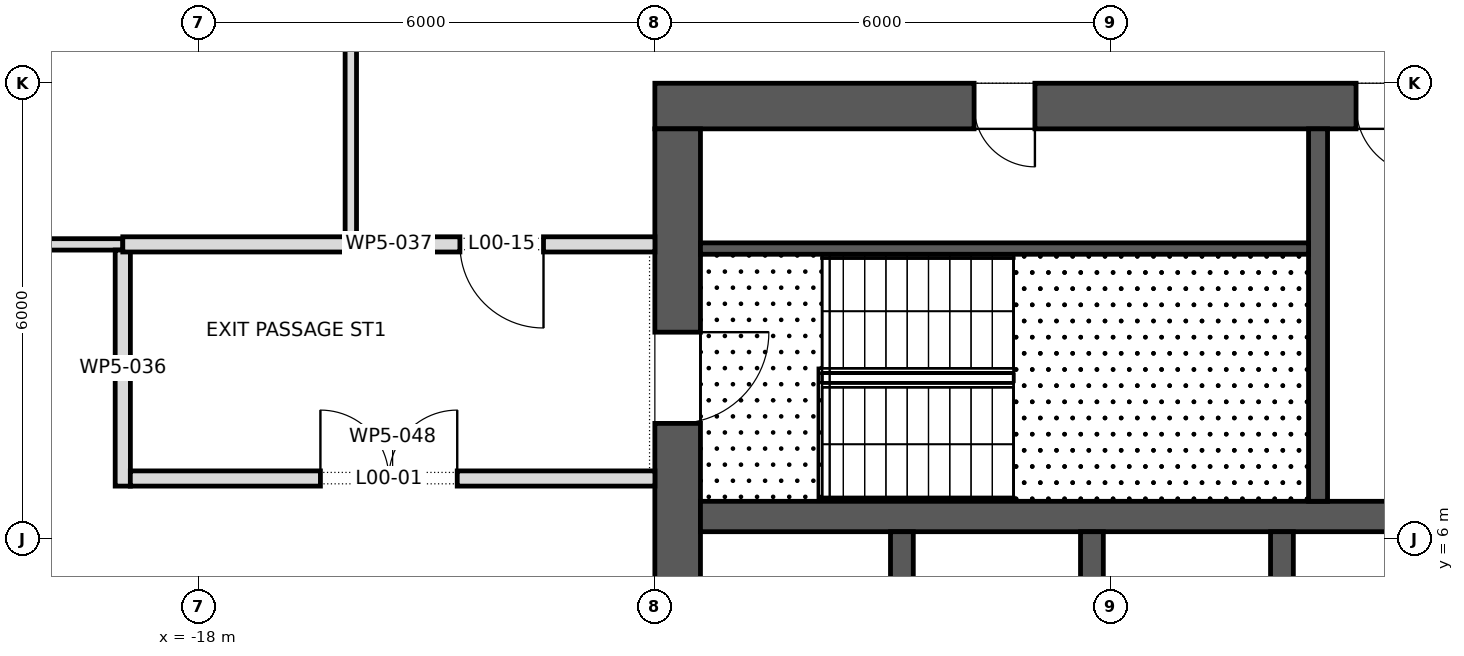
"""IFC4 building model, lengths in metres.
Left out: names, types, materials, properties, quantities, classifications, styles, units other than length and angle.
Written with IfcOpenShell. Run it as: python <this file> out.ifc"""

import sys

from ifc_helpers import new_model, si_unit, direction, frame, frame_2d, origin, place, context, subcontext, project, spatial, polyline, rectangle, outline, extrude, element, fill, save


model = new_model("IFC4")
c1 = context("Model", 3, precision=1e-05, world=origin(), true_north=direction((0.0, 1.0)))
c2 = subcontext(c1, "Body", "Model", "MODEL_VIEW")
j1 = project(units=[si_unit("LENGTHUNIT", "METRE"), si_unit("PLANEANGLEUNIT", "RADIAN")], contexts=[c1])
p1 = place(None, origin())
s1 = spatial("IfcSite", under=j1, at=p1, CompositionType="ELEMENT")
p2 = place(p1, origin())
s2 = spatial("IfcBuilding", under=s1, at=p2, CompositionType="ELEMENT")
p3 = place(p2, origin())
s3 = spatial("IfcBuildingStorey", under=s2, at=p3, CompositionType="ELEMENT", Elevation=0.0)
p4 = place(p3, frame((-12.0, 11.7, 0.0), z_axis=(0.0, 0.0, 1.0), x_axis=(1.0, 0.0, 0.0)))
e1 = element("IfcWall", 1, at=p4, inside=s3, PredefinedType="SHEAR", context=c2, shape_type="SweptSolid", body=[
    extrude(rectangle(XDim=24.0, YDim=0.6, at=frame_2d((12.0, 0.0))), origin(), (0.0, 0.0, 1.0), 7.0),
])
p5 = place(p4, frame((9.225, 0.0, 0.0)))
e2 = element("IfcOpeningElement", 2, at=p5, cuts=e1, PredefinedType="OPENING", context=c2, shape_type="SweptSolid", body=[
    extrude(rectangle(XDim=0.9, YDim=2.1, at=frame_2d((0.45, 1.05))), frame((0.0, 0.312, 0.0), z_axis=(0.0, -1.0, 0.0), x_axis=(1.0, 0.0, 0.0)), (0.0, 0.0, 1.0), 0.624),
])
p6 = place(p4, frame((10.925, 0.0, 0.0)))
e3 = element("IfcOpeningElement", 3, at=p6, cuts=e1, PredefinedType="OPENING", context=c2, shape_type="SweptSolid", body=[
    extrude(rectangle(XDim=0.8, YDim=2.1, at=frame_2d((0.4, 1.05))), frame((0.0, 0.312, 0.0), z_axis=(0.0, -1.0, 0.0), x_axis=(1.0, 0.0, 0.0)), (0.0, 0.0, 1.0), 0.624),
])
p7 = place(p4, frame((4.2, 0.0, 0.0)))
e4 = element("IfcOpeningElement", 4, at=p7, cuts=e1, PredefinedType="OPENING", context=c2, shape_type="SweptSolid", body=[
    extrude(rectangle(XDim=0.8, YDim=2.1, at=frame_2d((0.4, 1.05))), frame((0.0, 0.312, 0.0), z_axis=(0.0, -1.0, 0.0), x_axis=(1.0, 0.0, 0.0)), (0.0, 0.0, 1.0), 0.624),
])
p8 = place(p4, frame((13.8, 0.0, 0.0)))
e5 = element("IfcOpeningElement", 5, at=p8, cuts=e1, PredefinedType="OPENING", context=c2, shape_type="SweptSolid", body=[
    extrude(rectangle(XDim=0.8, YDim=2.1, at=frame_2d((0.4, 1.05))), frame((0.0, 0.312, 0.0), z_axis=(0.0, -1.0, 0.0), x_axis=(1.0, 0.0, 0.0)), (0.0, 0.0, 1.0), 0.624),
])
p9 = place(p4, frame((16.6, 0.0, 0.0)))
e6 = element("IfcOpeningElement", 6, at=p9, cuts=e1, PredefinedType="OPENING", context=c2, shape_type="SweptSolid", body=[
    extrude(rectangle(XDim=0.8, YDim=2.1, at=frame_2d((0.4, 1.05))), frame((0.0, 0.312, 0.0), z_axis=(0.0, -1.0, 0.0), x_axis=(1.0, 0.0, 0.0)), (0.0, 0.0, 1.0), 0.624),
])
p10 = place(p3, frame((-11.7, -11.4, 0.0), z_axis=(0.0, 0.0, 1.0), x_axis=(0.0, 1.0, 0.0)))
e7 = element("IfcWall", 7, at=p10, inside=s3, PredefinedType="SHEAR", context=c2, shape_type="SweptSolid", body=[
    extrude(rectangle(XDim=22.8, YDim=0.6, at=frame_2d((11.4, 0.0))), origin(), (0.0, 0.0, 1.0), 7.0),
])
p11 = place(p10, frame((10.2, 0.0, 0.0)))
e8 = element("IfcOpeningElement", 8, at=p11, cuts=e7, PredefinedType="OPENING", context=c2, shape_type="SweptSolid", body=[
    extrude(rectangle(XDim=2.4, YDim=2.1, at=frame_2d((1.2, 1.05))), frame((0.0, 0.312, 0.0), z_axis=(0.0, -1.0, 0.0), x_axis=(1.0, 0.0, 0.0)), (0.0, 0.0, 1.0), 0.624),
])
p12 = place(p10, frame((18.925, 0.0, 0.0)))
e9 = element("IfcOpeningElement", 9, at=p12, cuts=e7, PredefinedType="OPENING", context=c2, shape_type="SweptSolid", body=[
    extrude(rectangle(XDim=1.2, YDim=2.1, at=frame_2d((0.6, 1.05))), frame((0.0, 0.312, 0.0), z_axis=(0.0, -1.0, 0.0), x_axis=(1.0, 0.0, 0.0)), (0.0, 0.0, 1.0), 0.624),
])
p13 = place(p10, frame((2.675, 0.0, 0.0)))
e10 = element("IfcOpeningElement", 10, at=p13, cuts=e7, PredefinedType="OPENING", context=c2, shape_type="SweptSolid", body=[
    extrude(rectangle(XDim=1.2, YDim=2.1, at=frame_2d((0.6, 1.05))), frame((0.0, 0.312, 0.0), z_axis=(0.0, -1.0, 0.0), x_axis=(1.0, 0.0, 0.0)), (0.0, 0.0, 1.0), 0.624),
])
p14 = place(p3, frame((-11.4, 6.3, 0.0), z_axis=(0.0, 0.0, 1.0), x_axis=(1.0, 0.0, 0.0)))
e11 = element("IfcWall", 11, at=p14, inside=s3, PredefinedType="SHEAR", context=c2, shape_type="SweptSolid", body=[
    extrude(rectangle(XDim=22.8, YDim=0.4, at=frame_2d((11.4, 0.0))), origin(), (0.0, 0.0, 1.0), 7.0),
])
p15 = place(p14, frame((20.85, 0.0, 0.0)))
e12 = element("IfcOpeningElement", 12, at=p15, cuts=e11, PredefinedType="OPENING", context=c2, shape_type="SweptSolid", body=[
    extrude(rectangle(XDim=1.1, YDim=2.1, at=frame_2d((0.55, 1.05))), frame((0.0, 0.212, 0.0), z_axis=(0.0, -1.0, 0.0), x_axis=(1.0, 0.0, 0.0)), (0.0, 0.0, 1.0), 0.424),
])
for number, where, z_axis, x_axis in (
    (13, (-8.75, 3.2, 0.0), (0.0, 0.0, 1.0), (0.0, 1.0, 0.0)),
    (14, (-6.25, 3.2, 0.0), (0.0, 0.0, 1.0), (0.0, 1.0, 0.0)),
    (15, (-3.75, 3.2, 0.0), (0.0, 0.0, 1.0), (0.0, 1.0, 0.0)),
):
    element("IfcWall", number, at=place(p3, frame(where, z_axis=z_axis, x_axis=x_axis)), inside=s3, PredefinedType="SHEAR", context=c2, shape_type="SweptSolid", body=[
        extrude(rectangle(XDim=2.9, YDim=0.3, at=frame_2d((1.45, 0.0))), origin(), (0.0, 0.0, 1.0), 7.0),
    ])
p16 = place(p3, frame((-3.275, 6.5, 0.0), z_axis=(0.0, 0.0, 1.0), x_axis=(0.0, 1.0, 0.0)))
e16 = element("IfcWall", 16, at=p16, inside=s3, PredefinedType="SHEAR", context=c2, shape_type="SweptSolid", body=[
    extrude(rectangle(XDim=4.9, YDim=0.25, at=frame_2d((2.45, 0.0))), origin(), (0.0, 0.0, 1.0), 6.65),
])
p17 = place(p3, frame((-11.4, 9.825, 0.0), z_axis=(0.0, 0.0, 1.0), x_axis=(1.0, 0.0, 0.0)))
e17 = element("IfcWall", 17, at=p17, inside=s3, PredefinedType="SHEAR", context=c2, shape_type="SweptSolid", body=[
    extrude(rectangle(XDim=8.0, YDim=0.15, at=frame_2d((4.0, 0.0))), origin(), (0.0, 0.0, 1.0), 6.65),
])
p18 = place(p3, frame((-35.65, 9.88, 0.0), z_axis=(0.0, 0.0, 1.0), x_axis=(1.0, 0.0, 0.0)))
e18 = element("IfcWall", 18, at=p18, inside=s3, PredefinedType="PARTITIONING", context=c2, shape_type="SweptSolid", body=[
    extrude(outline(polyline([(-0.017, -0.075), (16.651, -0.075), (16.651, 0.075), (0.017, 0.075), (-0.017, -0.075)])), origin(), (0.0, 0.0, 1.0), 6.65),
])
p19 = place(p18, frame((7.445, 0.0, 0.0)))
e19 = element("IfcOpeningElement", 19, at=p19, cuts=e18, PredefinedType="OPENING", context=c2, shape_type="SweptSolid", body=[
    extrude(rectangle(XDim=1.8, YDim=2.1, at=frame_2d((0.9, 1.05))), frame((0.0, 0.087, 0.0), z_axis=(0.0, -1.0, 0.0), x_axis=(1.0, 0.0, 0.0)), (0.0, 0.0, 1.0), 0.174),
])
p20 = place(p3, frame((-19.0, 6.7, 0.0), z_axis=(0.0, 0.0, 1.0), x_axis=(0.0, 1.0, 0.0)))
e20 = element("IfcWall", 20, at=p20, inside=s3, PredefinedType="PARTITIONING", context=c2, shape_type="SweptSolid", body=[
    extrude(rectangle(XDim=3.105, YDim=0.2, at=frame_2d((1.553, 0.0))), origin(), (0.0, 0.0, 1.0), 6.65),
])
p21 = place(p3, frame((-19.0, 9.88, 0.0), z_axis=(0.0, 0.0, 1.0), x_axis=(1.0, 0.0, 0.0)))
e21 = element("IfcWall", 21, at=p21, inside=s3, PredefinedType="PARTITIONING", context=c2, shape_type="SweptSolid", body=[
    extrude(rectangle(XDim=7.001, YDim=0.2, at=frame_2d((3.5, 0.0))), origin(), (0.0, 0.0, 1.0), 6.65),
])
p22 = place(p21, frame((4.435, 0.0, 0.0)))
e22 = element("IfcOpeningElement", 22, at=p22, cuts=e21, PredefinedType="OPENING", context=c2, shape_type="SweptSolid", body=[
    extrude(rectangle(XDim=1.1, YDim=2.1, at=frame_2d((0.55, 1.05))), frame((0.0, 0.112, 0.0), z_axis=(0.0, -1.0, 0.0), x_axis=(1.0, 0.0, 0.0)), (0.0, 0.0, 1.0), 0.224),
])
p23 = place(p3, frame((-16.0, 9.98, 0.0), z_axis=(0.0, 0.0, 1.0), x_axis=(0.0, 1.0, 0.0)))
e23 = element("IfcWall", 23, at=p23, inside=s3, PredefinedType="PARTITIONING", context=c2, shape_type="SweptSolid", body=[
    extrude(rectangle(XDim=14.095, YDim=0.15, at=frame_2d((7.047, 0.0))), origin(), (0.0, 0.0, 1.0), 6.65),
])
p24 = place(p23, frame((5.76, 0.0, 0.0)))
e24 = element("IfcOpeningElement", 24, at=p24, cuts=e23, PredefinedType="OPENING", context=c2, shape_type="SweptSolid", body=[
    extrude(rectangle(XDim=2.4, YDim=2.1, at=frame_2d((1.2, 1.05))), frame((0.0, 0.087, 0.0), z_axis=(0.0, -1.0, 0.0), x_axis=(1.0, 0.0, 0.0)), (0.0, 0.0, 1.0), 0.174),
])
p25 = place(p3, frame((-11.999, 6.8, 0.0), z_axis=(0.0, 0.0, 1.0), x_axis=(-1.0, 0.0, 0.0)))
e25 = element("IfcWall", 25, at=p25, inside=s3, PredefinedType="PARTITIONING", context=c2, shape_type="SweptSolid", body=[
    extrude(rectangle(XDim=6.902, YDim=0.2, at=frame_2d((3.451, 0.0))), origin(), (0.0, 0.0, 1.0), 6.65),
])
p26 = place(p25, frame((2.601, 0.0, 0.0)))
e26 = element("IfcOpeningElement", 26, at=p26, cuts=e25, PredefinedType="OPENING", context=c2, shape_type="SweptSolid", body=[
    extrude(rectangle(XDim=1.8, YDim=2.1, at=frame_2d((0.9, 1.05))), frame((0.0, 0.112, 0.0), z_axis=(0.0, -1.0, 0.0), x_axis=(1.0, 0.0, 0.0)), (0.0, 0.0, 1.0), 0.224),
])
p27 = place(p12, frame((1.2, 0.0, 0.0), z_axis=(0.0, 0.0, 1.0), x_axis=(-1.0, 0.0, 0.0)))
e27 = element("IfcDoor", 27, at=p27, inside=s3, OperationType="SINGLE_SWING_RIGHT", PredefinedType="DOOR", context=c2, shape_type="SweptSolid", body=[
    extrude(rectangle(XDim=1.2, YDim=2.1, at=frame_2d((0.6, 1.05))), frame((0.0, 0.025, 0.0), z_axis=(0.0, -1.0, 0.0), x_axis=(1.0, 0.0, 0.0)), (0.0, 0.0, 1.0), 0.05),
])
fill(e9, e27)
p28 = place(p5, frame((0.9, 0.0, 0.0), z_axis=(0.0, 0.0, 1.0), x_axis=(-1.0, 0.0, 0.0)))
e28 = element("IfcDoor", 28, at=p28, inside=s3, OperationType="SINGLE_SWING_RIGHT", PredefinedType="DOOR", context=c2, shape_type="SweptSolid", body=[
    extrude(rectangle(XDim=0.9, YDim=2.1, at=frame_2d((0.45, 1.05))), frame((0.0, 0.025, 0.0), z_axis=(0.0, -1.0, 0.0), x_axis=(1.0, 0.0, 0.0)), (0.0, 0.0, 1.0), 0.05),
])
fill(e2, e28)
p29 = place(p7, frame((0.8, 0.0, 0.0), z_axis=(0.0, 0.0, 1.0), x_axis=(-1.0, 0.0, 0.0)))
e29 = element("IfcDoor", 29, at=p29, inside=s3, OperationType="SINGLE_SWING_RIGHT", PredefinedType="DOOR", context=c2, shape_type="SweptSolid", body=[
    extrude(rectangle(XDim=0.8, YDim=2.1, at=frame_2d((0.4, 1.05))), frame((0.0, 0.025, 0.0), z_axis=(0.0, -1.0, 0.0), x_axis=(1.0, 0.0, 0.0)), (0.0, 0.0, 1.0), 0.05),
])
fill(e4, e29)
p30 = place(p26, frame((1.8, 0.0, 0.0), z_axis=(0.0, 0.0, 1.0), x_axis=(-1.0, 0.0, 0.0)))
e30 = element("IfcDoor", 30, at=p30, inside=s3, OperationType="DOUBLE_DOOR_SINGLE_SWING", PredefinedType="DOOR", context=c2, shape_type="SweptSolid", body=[
    extrude(rectangle(XDim=1.8, YDim=2.1, at=frame_2d((0.9, 1.05))), frame((0.0, 0.025, 0.0), z_axis=(0.0, -1.0, 0.0), x_axis=(1.0, 0.0, 0.0)), (0.0, 0.0, 1.0), 0.05),
])
fill(e26, e30)
p31 = place(p22, frame((1.1, 0.0, 0.0), z_axis=(0.0, 0.0, 1.0), x_axis=(-1.0, 0.0, 0.0)))
e31 = element("IfcDoor", 31, at=p31, inside=s3, OperationType="SINGLE_SWING_RIGHT", PredefinedType="DOOR", context=c2, shape_type="SweptSolid", body=[
    extrude(rectangle(XDim=1.1, YDim=2.1, at=frame_2d((0.55, 1.05))), frame((0.0, 0.025, 0.0), z_axis=(0.0, -1.0, 0.0), x_axis=(1.0, 0.0, 0.0)), (0.0, 0.0, 1.0), 0.05),
])
fill(e22, e31)
save(model, sys.argv[1])
